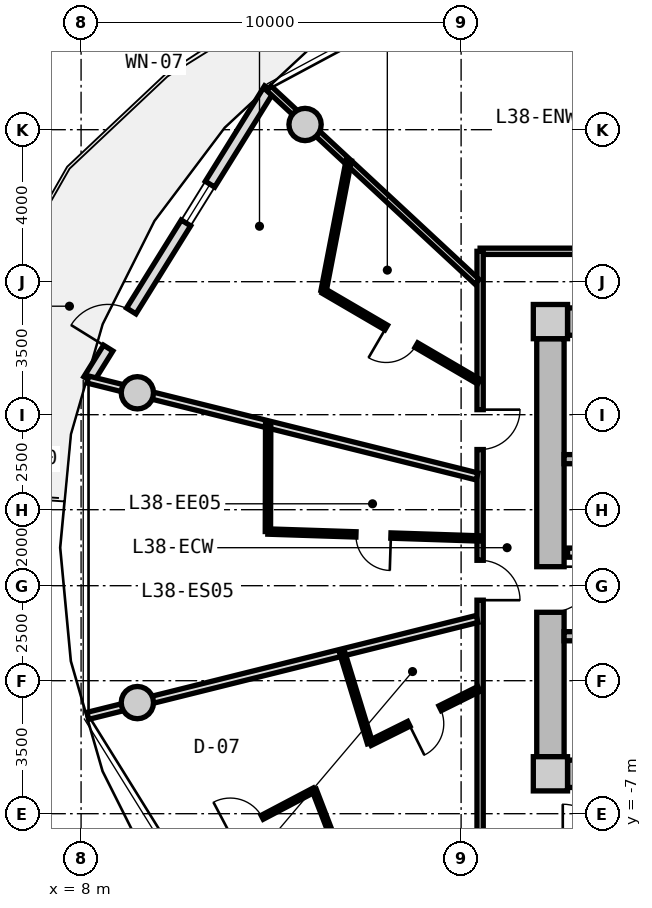
"""IFC4 building model, lengths in metres.
Left out: names, types, materials, properties, quantities, classifications, styles, units other than length and angle.
Written with IfcOpenShell. Run it as: python <this file> out.ifc"""

import sys

from ifc_helpers import new_model, si_unit, direction, frame, frame_2d, origin, origin_2d, place, context, subcontext, project, spatial, rectangle, circle, extrude, source, transform, mapped, element, fill, save


model = new_model("IFC4")
c1 = context("Model", 3, precision=1e-05, world=origin(), true_north=direction((0.0, 1.0)))
c2 = subcontext(c1, "Body", "Model", "MODEL_VIEW")
j1 = project(units=[si_unit("LENGTHUNIT", "METRE"), si_unit("PLANEANGLEUNIT", "RADIAN")], contexts=[c1])
p1 = place(None, origin())
s1 = spatial("IfcSite", under=j1, at=p1, CompositionType="ELEMENT")
p2 = place(p1, origin())
s2 = spatial("IfcBuilding", under=s1, at=p2, CompositionType="ELEMENT")
p3 = place(p2, frame((0.0, 0.0, 123.7)))
s3 = spatial("IfcBuildingStorey", under=s2, at=p3, CompositionType="ELEMENT", Elevation=123.7)
m1 = source(origin(), c2, "Body", "SweptSolid", [
    extrude(rectangle(XDim=0.9, YDim=0.9, at=origin_2d()), origin(), (0.0, 0.0, 1.0), 3.05),
])
for number, where, z_axis, x_axis in (
    (1, (20.35, -5.95, 0.0), (0.0, 0.0, 1.0), (1.0, 0.0, 0.0)),
    (2, (20.35, 5.95, 0.0), (0.0, 0.0, 1.0), (1.0, 0.0, 0.0)),
):
    element("IfcColumn", number, at=place(p3, frame(where, z_axis=z_axis, x_axis=x_axis)), inside=s3, PredefinedType="COLUMN", context=c2, shape_type="MappedRepresentation", body=[
        mapped(m1, transform((0.0, 0.0, 0.0), x_axis=(1.0, 0.0, 0.0), y_axis=(0.0, 1.0, 0.0), z_axis=(0.0, 0.0, 1.0), scale=1.0)),
    ])
m2 = source(origin(), c2, "Body", "SweptSolid", [
    extrude(rectangle(XDim=14.4, YDim=0.72, at=frame_2d((7.2, 0.0))), origin(), (0.0, 0.0, 1.0), 2.79),
])
for number, where, z_axis, x_axis in (
    (3, (20.8, 5.95, 0.0), (0.0, 0.0, 1.0), (1.0, 0.0, 0.0)),
    (4, (35.2, -5.95, 0.0), (0.0, 0.0, 1.0), (-1.0, 0.0, 0.0)),
):
    element("IfcWall", number, at=place(p3, frame(where, z_axis=z_axis, x_axis=x_axis)), inside=s3, PredefinedType="SHEAR", context=c2, shape_type="MappedRepresentation", body=[
        mapped(m2, transform((0.0, 0.0, 0.0), x_axis=(1.0, 0.0, 0.0), y_axis=(0.0, 1.0, 0.0), z_axis=(0.0, 0.0, 1.0), scale=1.0)),
    ])
m3 = source(origin(), c2, "Body", "SweptSolid", [
    extrude(rectangle(XDim=11.0, YDim=0.72, at=frame_2d((5.5, 0.0))), origin(), (0.0, 0.0, 1.0), 2.79),
])
p4 = place(p3, frame((20.35, -5.5, 0.0), z_axis=(0.0, 0.0, 1.0), x_axis=(0.0, 1.0, 0.0)))
e5 = element("IfcWall", 5, at=p4, inside=s3, PredefinedType="SHEAR", context=c2, shape_type="MappedRepresentation", body=[
    mapped(m3, transform((0.0, 0.0, 0.0), x_axis=(1.0, 0.0, 0.0), y_axis=(0.0, 1.0, 0.0), z_axis=(0.0, 0.0, 1.0), scale=1.0)),
])
p5 = place(p4, frame((3.8, 0.0, 0.0)))
e6 = element("IfcOpeningElement", 6, at=p5, cuts=e5, PredefinedType="OPENING", context=c2, shape_type="SweptSolid", body=[
    extrude(rectangle(XDim=1.2, YDim=2.15, at=frame_2d((0.6, 1.075))), frame((0.0, 0.37, 0.0), z_axis=(0.0, -1.0, 0.0), x_axis=(1.0, 0.0, 0.0)), (0.0, 0.0, 1.0), 0.74),
])
m4 = source(origin(), c2, "Body", "SweptSolid", [
    extrude(circle(Radius=0.425, at=origin_2d()), origin(), (0.0, 0.0, 1.0), 3.05),
])
for number, where, z_axis, x_axis in (
    (7, (13.894, 11.137, 0.0), (0.0, 0.0, 1.0), (1.0, 0.0, 0.0)),
    (8, (9.481, 4.076, 0.0), (0.0, 0.0, 1.0), (1.0, 0.0, 0.0)),
    (9, (9.481, -4.076, 0.0), (0.0, 0.0, 1.0), (1.0, 0.0, 0.0)),
):
    element("IfcColumn", number, at=place(p3, frame(where, z_axis=z_axis, x_axis=x_axis)), inside=s3, PredefinedType="COLUMN", context=c2, shape_type="MappedRepresentation", body=[
        mapped(m4, transform((0.0, 0.0, 0.0), x_axis=(1.0, 0.0, 0.0), y_axis=(0.0, 1.0, 0.0), z_axis=(0.0, 0.0, 1.0), scale=1.0)),
    ])
m5 = source(origin(), c2, "Body", "SweptSolid", [
    extrude(rectangle(XDim=9.014, YDim=0.29, at=frame_2d((4.507, 0.0))), origin(), (0.0, 0.0, 1.0), 2.79),
])
p6 = place(p3, frame((8.196, 4.421, 0.0), z_axis=(0.0, 0.0, 1.0), x_axis=(0.527732945084, 0.849410347637, 0.0)))
e10 = element("IfcWall", 10, at=p6, inside=s3, PredefinedType="SOLIDWALL", context=c2, shape_type="MappedRepresentation", body=[
    mapped(m5, transform((0.0, 0.0, 0.0), x_axis=(1.0, 0.0, 0.0), y_axis=(0.0, 1.0, 0.0), z_axis=(0.0, 0.0, 1.0), scale=1.0)),
])
p7 = place(p6, frame((0.98, 0.0, 0.0)))
e11 = element("IfcOpeningElement", 11, at=p7, cuts=e10, PredefinedType="OPENING", context=c2, shape_type="SweptSolid", body=[
    extrude(rectangle(XDim=1.15, YDim=2.25, at=frame_2d((0.575, 1.125))), frame((0.0, 0.155, 0.0), z_axis=(0.0, -1.0, 0.0), x_axis=(1.0, 0.0, 0.0)), (0.0, 0.0, 1.0), 0.31),
])
p8 = place(p6, frame((4.857, 0.0, 0.85)))
e12 = element("IfcOpeningElement", 12, at=p8, cuts=e10, PredefinedType="OPENING", context=c2, shape_type="SweptSolid", body=[
    extrude(rectangle(XDim=1.2, YDim=1.5, at=frame_2d((0.6, 0.75))), frame((0.0, 0.155, 0.0), z_axis=(0.0, -1.0, 0.0), x_axis=(1.0, 0.0, 0.0)), (0.0, 0.0, 1.0), 0.31),
])
m6 = source(origin(), c2, "Body", "SweptSolid", [
    extrude(rectangle(XDim=7.83, YDim=0.24, at=frame_2d((3.915, 0.0))), origin(), (0.0, 0.0, 1.0), 2.79),
])
p9 = place(p3, frame((20.71, 2.33, 0.0), z_axis=(0.0, 0.0, 1.0), x_axis=(1.0, 0.0, 0.0)))
e13 = element("IfcWall", 13, at=p9, inside=s3, PredefinedType="PARTITIONING", context=c2, shape_type="MappedRepresentation", body=[
    mapped(m6, transform((0.0, 0.0, 0.0), x_axis=(1.0, 0.0, 0.0), y_axis=(0.0, 1.0, 0.0), z_axis=(0.0, 0.0, 1.0), scale=1.0)),
])
p10 = place(p3, frame((20.71, -2.33, 0.0), z_axis=(0.0, 0.0, 1.0), x_axis=(1.0, 0.0, 0.0)))
e14 = element("IfcWall", 14, at=p10, inside=s3, PredefinedType="PARTITIONING", context=c2, shape_type="MappedRepresentation", body=[
    mapped(m6, transform((0.0, 0.0, 0.0), x_axis=(1.0, 0.0, 0.0), y_axis=(0.0, 1.0, 0.0), z_axis=(0.0, 0.0, 1.0), scale=1.0)),
])
p11 = place(p10, frame((0.95, 0.0, 0.0)))
e15 = element("IfcOpeningElement", 15, at=p11, cuts=e14, PredefinedType="OPENING", context=c2, shape_type="SweptSolid", body=[
    extrude(rectangle(XDim=1.1, YDim=2.15, at=frame_2d((0.55, 1.075))), frame((0.0, 0.13, 0.0), z_axis=(0.0, -1.0, 0.0), x_axis=(1.0, 0.0, 0.0)), (0.0, 0.0, 1.0), 0.26),
])
m7 = source(origin(), c2, "Body", "SweptSolid", [
    extrude(rectangle(XDim=7.62, YDim=0.24, at=frame_2d((3.81, 0.0))), origin(), (0.0, 0.0, 1.0), 2.775),
])
p12 = place(p3, frame((20.8, -0.13, 0.0), z_axis=(0.0, 0.0, 1.0), x_axis=(1.0, 0.0, 0.0)))
e16 = element("IfcWall", 16, at=p12, inside=s3, PredefinedType="PARTITIONING", context=c2, shape_type="MappedRepresentation", body=[
    mapped(m7, transform((0.0, 0.0, 0.0), x_axis=(1.0, 0.0, 0.0), y_axis=(0.0, 1.0, 0.0), z_axis=(0.0, 0.0, 1.0), scale=1.0)),
])
p13 = place(p12, frame((6.22, 0.0, 0.0)))
e17 = element("IfcOpeningElement", 17, at=p13, cuts=e16, PredefinedType="OPENING", context=c2, shape_type="SweptSolid", body=[
    extrude(rectangle(XDim=1.0, YDim=2.1, at=frame_2d((0.5, 1.05))), frame((0.0, 0.13, 0.0), z_axis=(0.0, -1.0, 0.0), x_axis=(1.0, 0.0, 0.0)), (0.0, 0.0, 1.0), 0.26),
])
p14 = place(p12, frame((2.4, 0.0, 0.0)))
e18 = element("IfcOpeningElement", 18, at=p14, cuts=e16, PredefinedType="OPENING", context=c2, shape_type="SweptSolid", body=[
    extrude(rectangle(XDim=1.0, YDim=2.1, at=frame_2d((0.5, 1.05))), frame((0.0, 0.13, 0.0), z_axis=(0.0, -1.0, 0.0), x_axis=(1.0, 0.0, 0.0)), (0.0, 0.0, 1.0), 0.26),
])
m8 = source(origin(), c2, "Body", "SweptSolid", [
    extrude(rectangle(XDim=8.6, YDim=0.165, at=frame_2d((4.3, 0.0))), origin(), (0.0, 0.0, 1.0), 2.775),
])
p15 = place(p3, frame((18.5, 7.8, 0.0), z_axis=(0.0, 0.0, 1.0), x_axis=(1.0, 0.0, 0.0)))
e19 = element("IfcWall", 19, at=p15, inside=s3, PredefinedType="PARTITIONING", context=c2, shape_type="MappedRepresentation", body=[
    mapped(m8, transform((0.0, 0.0, 0.0), x_axis=(1.0, 0.0, 0.0), y_axis=(0.0, 1.0, 0.0), z_axis=(0.0, 0.0, 1.0), scale=1.0)),
])
p16 = place(p15, frame((3.509, 0.0, 0.0)))
e20 = element("IfcOpeningElement", 20, at=p16, cuts=e19, PredefinedType="OPENING", context=c2, shape_type="SweptSolid", body=[
    extrude(rectangle(XDim=1.05, YDim=2.15, at=frame_2d((0.525, 1.075))), frame((0.0, 0.093, 0.0), z_axis=(0.0, -1.0, 0.0), x_axis=(1.0, 0.0, 0.0)), (0.0, 0.0, 1.0), 0.185),
])
m9 = source(origin(), c2, "Body", "SweptSolid", [
    extrude(rectangle(XDim=15.6, YDim=0.165, at=frame_2d((7.8, 0.0))), origin(), (0.0, 0.0, 1.0), 2.775),
])
p17 = place(p3, frame((18.5, -7.8, 0.0), z_axis=(0.0, 0.0, 1.0), x_axis=(0.0, 1.0, 0.0)))
e21 = element("IfcWall", 21, at=p17, inside=s3, PredefinedType="PARTITIONING", context=c2, shape_type="MappedRepresentation", body=[
    mapped(m9, transform((0.0, 0.0, 0.0), x_axis=(1.0, 0.0, 0.0), y_axis=(0.0, 1.0, 0.0), z_axis=(0.0, 0.0, 1.0), scale=1.0)),
])
p18 = place(p17, frame((10.383, 0.0, 0.0)))
e22 = element("IfcOpeningElement", 22, at=p18, cuts=e21, PredefinedType="OPENING", context=c2, shape_type="SweptSolid", body=[
    extrude(rectangle(XDim=1.05, YDim=2.15, at=frame_2d((0.525, 1.075))), frame((0.0, 0.093, 0.0), z_axis=(0.0, -1.0, 0.0), x_axis=(1.0, 0.0, 0.0)), (0.0, 0.0, 1.0), 0.185),
])
p19 = place(p17, frame((6.419, 0.0, 0.0)))
e23 = element("IfcOpeningElement", 23, at=p19, cuts=e21, PredefinedType="OPENING", context=c2, shape_type="SweptSolid", body=[
    extrude(rectangle(XDim=1.05, YDim=2.15, at=frame_2d((0.525, 1.075))), frame((0.0, 0.093, 0.0), z_axis=(0.0, -1.0, 0.0), x_axis=(1.0, 0.0, 0.0)), (0.0, 0.0, 1.0), 0.185),
])
m10 = source(origin(), c2, "Body", "SweptSolid", [
    extrude(rectangle(XDim=7.482, YDim=0.165, at=frame_2d((3.741, 0.0))), origin(), (0.0, 0.0, 1.0), 2.275),
])
p20 = place(p3, frame((18.42, 6.998, 0.0), z_axis=(0.0, 0.0, 1.0), x_axis=(-0.732508698043, 0.680757671489, 0.0)))
e24 = element("IfcWall", 24, at=p20, inside=s3, PredefinedType="PARTITIONING", context=c2, shape_type="MappedRepresentation", body=[
    mapped(m10, transform((0.0, 0.0, 0.0), x_axis=(1.0, 0.0, 0.0), y_axis=(0.0, 1.0, 0.0), z_axis=(0.0, 0.0, 1.0), scale=1.0)),
])
m11 = source(origin(), c2, "Body", "SweptSolid", [
    extrude(rectangle(XDim=10.556, YDim=0.19, at=frame_2d((5.278, 0.0))), origin(), (0.0, 0.0, 1.0), 2.275),
])
p21 = place(p3, frame((18.42, 1.875, 0.0), z_axis=(0.0, 0.0, 1.0), x_axis=(-0.970363857851, 0.241648470667, 0.0)))
e25 = element("IfcWall", 25, at=p21, inside=s3, PredefinedType="PARTITIONING", context=c2, shape_type="MappedRepresentation", body=[
    mapped(m11, transform((0.0, 0.0, 0.0), x_axis=(1.0, 0.0, 0.0), y_axis=(0.0, 1.0, 0.0), z_axis=(0.0, 0.0, 1.0), scale=1.0)),
])
m12 = source(origin(), c2, "Body", "SweptSolid", [
    extrude(rectangle(XDim=4.735, YDim=0.14, at=frame_2d((2.368, 0.0))), origin(), (0.0, 0.0, 1.0), 2.775),
])
p22 = place(p3, frame((18.47, 4.368, 0.0), z_axis=(0.0, 0.0, 1.0), x_axis=(-0.863537576642, 0.504284496814, 0.0)))
e26 = element("IfcWall", 26, at=p22, inside=s3, PredefinedType="PARTITIONING", context=c2, shape_type="MappedRepresentation", body=[
    mapped(m12, transform((0.0, 0.0, 0.0), x_axis=(1.0, 0.0, 0.0), y_axis=(0.0, 1.0, 0.0), z_axis=(0.0, 0.0, 1.0), scale=1.0)),
])
p23 = place(p22, frame((1.908, 0.0, 0.0)))
e27 = element("IfcOpeningElement", 27, at=p23, cuts=e26, PredefinedType="OPENING", context=c2, shape_type="SweptSolid", body=[
    extrude(rectangle(XDim=0.92, YDim=2.1, at=frame_2d((0.46, 1.05))), frame((0.0, 0.08, 0.0), z_axis=(0.0, -1.0, 0.0), x_axis=(1.0, 0.0, 0.0)), (0.0, 0.0, 1.0), 0.16),
])
m13 = source(origin(), c2, "Body", "SweptSolid", [
    extrude(rectangle(XDim=3.499, YDim=0.14, at=frame_2d((1.75, 0.0))), origin(), (0.0, 0.0, 1.0), 2.775),
])
p24 = place(p3, frame((14.381, 6.756, 0.0), z_axis=(0.0, 0.0, 1.0), x_axis=(0.18957713629, 0.981865830649, 0.0)))
e28 = element("IfcWall", 28, at=p24, inside=s3, PredefinedType="PARTITIONING", context=c2, shape_type="MappedRepresentation", body=[
    mapped(m13, transform((0.0, 0.0, 0.0), x_axis=(1.0, 0.0, 0.0), y_axis=(0.0, 1.0, 0.0), z_axis=(0.0, 0.0, 1.0), scale=1.0)),
])
p25 = place(p3, frame((18.42, -1.875, 0.0), z_axis=(0.0, 0.0, 1.0), x_axis=(-0.970363857851, -0.241648470667, 0.0)))
e29 = element("IfcWall", 29, at=p25, inside=s3, PredefinedType="PARTITIONING", context=c2, shape_type="MappedRepresentation", body=[
    mapped(m11, transform((0.0, 0.0, 0.0), x_axis=(1.0, 0.0, 0.0), y_axis=(0.0, 1.0, 0.0), z_axis=(0.0, 0.0, 1.0), scale=1.0)),
])
m14 = source(origin(), c2, "Body", "SweptSolid", [
    extrude(rectangle(XDim=5.557, YDim=0.14, at=frame_2d((2.778, 0.0))), origin(), (0.0, 0.0, 1.0), 2.775),
])
p26 = place(p3, frame((18.47, 0.244, 0.0), z_axis=(0.0, 0.0, 1.0), x_axis=(-0.999468495627, 0.03259948234, 0.0)))
e30 = element("IfcWall", 30, at=p26, inside=s3, PredefinedType="PARTITIONING", context=c2, shape_type="MappedRepresentation", body=[
    mapped(m14, transform((0.0, 0.0, 0.0), x_axis=(1.0, 0.0, 0.0), y_axis=(0.0, 1.0, 0.0), z_axis=(0.0, 0.0, 1.0), scale=1.0)),
])
p27 = place(p26, frame((2.318, 0.0, 0.0)))
e31 = element("IfcOpeningElement", 31, at=p27, cuts=e30, PredefinedType="OPENING", context=c2, shape_type="SweptSolid", body=[
    extrude(rectangle(XDim=0.92, YDim=2.1, at=frame_2d((0.46, 1.05))), frame((0.0, 0.08, 0.0), z_axis=(0.0, -1.0, 0.0), x_axis=(1.0, 0.0, 0.0)), (0.0, 0.0, 1.0), 0.16),
])
m15 = source(origin(), c2, "Body", "SweptSolid", [
    extrude(rectangle(XDim=2.837, YDim=0.14, at=frame_2d((1.418, 0.0))), origin(), (0.0, 0.0, 1.0), 2.775),
])
p28 = place(p3, frame((12.916, 0.425, 0.0), z_axis=(0.0, 0.0, 1.0), x_axis=(0.002409838945, 0.999997096334, 0.0)))
e32 = element("IfcWall", 32, at=p28, inside=s3, PredefinedType="PARTITIONING", context=c2, shape_type="MappedRepresentation", body=[
    mapped(m15, transform((0.0, 0.0, 0.0), x_axis=(1.0, 0.0, 0.0), y_axis=(0.0, 1.0, 0.0), z_axis=(0.0, 0.0, 1.0), scale=1.0)),
])
m16 = source(origin(), c2, "Body", "SweptSolid", [
    extrude(rectangle(XDim=3.203, YDim=0.14, at=frame_2d((1.601, 0.0))), origin(), (0.0, 0.0, 1.0), 2.775),
])
p29 = place(p3, frame((18.47, -3.717, 0.0), z_axis=(0.0, 0.0, 1.0), x_axis=(-0.895552551978, -0.444955758077, 0.0)))
e33 = element("IfcWall", 33, at=p29, inside=s3, PredefinedType="PARTITIONING", context=c2, shape_type="MappedRepresentation", body=[
    mapped(m16, transform((0.0, 0.0, 0.0), x_axis=(1.0, 0.0, 0.0), y_axis=(0.0, 1.0, 0.0), z_axis=(0.0, 0.0, 1.0), scale=1.0)),
])
p30 = place(p29, frame((1.141, 0.0, 0.0)))
e34 = element("IfcOpeningElement", 34, at=p30, cuts=e33, PredefinedType="OPENING", context=c2, shape_type="SweptSolid", body=[
    extrude(rectangle(XDim=0.92, YDim=2.1, at=frame_2d((0.46, 1.05))), frame((0.0, 0.08, 0.0), z_axis=(0.0, -1.0, 0.0), x_axis=(1.0, 0.0, 0.0)), (0.0, 0.0, 1.0), 0.16),
])
m17 = source(origin(), c2, "Body", "SweptSolid", [
    extrude(rectangle(XDim=2.478, YDim=0.14, at=frame_2d((1.239, 0.0))), origin(), (0.0, 0.0, 1.0), 2.775),
])
p31 = place(p3, frame((15.602, -5.142, 0.0), z_axis=(0.0, 0.0, 1.0), x_axis=(-0.293372504398, 0.955998207981, 0.0)))
e35 = element("IfcWall", 35, at=p31, inside=s3, PredefinedType="PARTITIONING", context=c2, shape_type="MappedRepresentation", body=[
    mapped(m17, transform((0.0, 0.0, 0.0), x_axis=(1.0, 0.0, 0.0), y_axis=(0.0, 1.0, 0.0), z_axis=(0.0, 0.0, 1.0), scale=1.0)),
])
m18 = source(origin(), c2, "Body", "SweptSolid", [
    extrude(rectangle(XDim=4.042, YDim=0.115, at=frame_2d((2.021, 0.0))), origin(), (0.0, 0.0, 1.0), 2.775),
])
p32 = place(p3, frame((14.134, -6.375, 0.0), z_axis=(0.0, 0.0, 1.0), x_axis=(-0.88476748851, -0.466032714812, 0.0)))
e36 = element("IfcWall", 36, at=p32, inside=s3, PredefinedType="PARTITIONING", context=c2, shape_type="MappedRepresentation", body=[
    mapped(m18, transform((0.0, 0.0, 0.0), x_axis=(1.0, 0.0, 0.0), y_axis=(0.0, 1.0, 0.0), z_axis=(0.0, 0.0, 1.0), scale=1.0)),
])
p33 = place(p32, frame((1.546, 0.0, 0.0)))
e37 = element("IfcOpeningElement", 37, at=p33, cuts=e36, PredefinedType="OPENING", context=c2, shape_type="SweptSolid", body=[
    extrude(rectangle(XDim=0.95, YDim=2.1, at=frame_2d((0.475, 1.05))), frame((0.0, 0.067, 0.0), z_axis=(0.0, -1.0, 0.0), x_axis=(1.0, 0.0, 0.0)), (0.0, 0.0, 1.0), 0.135),
])
m19 = source(origin(), c2, "Body", "SweptSolid", [
    extrude(rectangle(XDim=3.677, YDim=0.115, at=frame_2d((1.838, 0.0))), origin(), (0.0, 0.0, 1.0), 2.775),
])
p34 = place(p3, frame((14.134, -6.375, 0.0), z_axis=(0.0, 0.0, 1.0), x_axis=(0.359592980271, -0.933109258629, 0.0)))
e38 = element("IfcWall", 38, at=p34, inside=s3, PredefinedType="PARTITIONING", context=c2, shape_type="MappedRepresentation", body=[
    mapped(m19, transform((0.0, 0.0, 0.0), x_axis=(1.0, 0.0, 0.0), y_axis=(0.0, 1.0, 0.0), z_axis=(0.0, 0.0, 1.0), scale=1.0)),
])
m20 = source(origin(), c2, "Body", "SweptSolid", [
    extrude(rectangle(XDim=1.15, YDim=2.25, at=frame_2d((0.575, 1.125))), frame((0.0, 0.025, 0.0), z_axis=(0.0, -1.0, 0.0), x_axis=(1.0, 0.0, 0.0)), (0.0, 0.0, 1.0), 0.05),
])
p35 = place(p7, origin())
e39 = element("IfcDoor", 39, at=p35, inside=s3, OperationType="SINGLE_SWING_LEFT", PredefinedType="DOOR", context=c2, shape_type="MappedRepresentation", body=[
    mapped(m20, transform((0.0, 0.0, 0.0), x_axis=(1.0, 0.0, 0.0), y_axis=(0.0, 1.0, 0.0), z_axis=(0.0, 0.0, 1.0), scale=1.0)),
])
fill(e11, e39)
m21 = source(origin(), c2, "Body", "SweptSolid", [
    extrude(rectangle(XDim=1.2, YDim=1.5, at=frame_2d((0.6, 0.75))), frame((0.0, 0.03, 0.0), z_axis=(0.0, -1.0, 0.0), x_axis=(1.0, 0.0, 0.0)), (0.0, 0.0, 1.0), 0.06),
])
p36 = place(p8, origin())
e40 = element("IfcWindow", 40, at=p36, inside=s3, PartitioningType="SINGLE_PANEL", PredefinedType="WINDOW", context=c2, shape_type="MappedRepresentation", body=[
    mapped(m21, transform((0.0, 0.0, 0.0), x_axis=(1.0, 0.0, 0.0), y_axis=(0.0, 1.0, 0.0), z_axis=(0.0, 0.0, 1.0), scale=1.0)),
])
fill(e12, e40)
m22 = source(origin(), c2, "Body", "SweptSolid", [
    extrude(rectangle(XDim=1.2, YDim=2.15, at=frame_2d((0.6, 1.075))), frame((0.0, 0.025, 0.0), z_axis=(0.0, -1.0, 0.0), x_axis=(1.0, 0.0, 0.0)), (0.0, 0.0, 1.0), 0.05),
])
p37 = place(p5, frame((1.2, 0.0, 0.0), z_axis=(0.0, 0.0, 1.0), x_axis=(-1.0, 0.0, 0.0)))
e41 = element("IfcDoor", 41, at=p37, inside=s3, OperationType="SINGLE_SWING_LEFT", PredefinedType="DOOR", context=c2, shape_type="MappedRepresentation", body=[
    mapped(m22, transform((0.0, 0.0, 0.0), x_axis=(1.0, 0.0, 0.0), y_axis=(0.0, 1.0, 0.0), z_axis=(0.0, 0.0, 1.0), scale=1.0)),
])
fill(e6, e41)
m23 = source(origin(), c2, "Body", "SweptSolid", [
    extrude(rectangle(XDim=1.05, YDim=2.15, at=frame_2d((0.525, 1.075))), frame((0.0, 0.025, 0.0), z_axis=(0.0, -1.0, 0.0), x_axis=(1.0, 0.0, 0.0)), (0.0, 0.0, 1.0), 0.05),
])
p38 = place(p18, frame((1.05, 0.0, 0.0), z_axis=(0.0, 0.0, 1.0), x_axis=(-1.0, 0.0, 0.0)))
e42 = element("IfcDoor", 42, at=p38, inside=s3, OperationType="SINGLE_SWING_LEFT", PredefinedType="DOOR", context=c2, shape_type="MappedRepresentation", body=[
    mapped(m23, transform((0.0, 0.0, 0.0), x_axis=(1.0, 0.0, 0.0), y_axis=(0.0, 1.0, 0.0), z_axis=(0.0, 0.0, 1.0), scale=1.0)),
])
fill(e22, e42)
m24 = source(origin(), c2, "Body", "SweptSolid", [
    extrude(rectangle(XDim=0.92, YDim=2.1, at=frame_2d((0.46, 1.05))), frame((0.0, 0.025, 0.0), z_axis=(0.0, -1.0, 0.0), x_axis=(1.0, 0.0, 0.0)), (0.0, 0.0, 1.0), 0.05),
])
p39 = place(p23, origin())
e43 = element("IfcDoor", 43, at=p39, inside=s3, OperationType="SINGLE_SWING_RIGHT", PredefinedType="DOOR", context=c2, shape_type="MappedRepresentation", body=[
    mapped(m24, transform((0.0, 0.0, 0.0), x_axis=(1.0, 0.0, 0.0), y_axis=(0.0, 1.0, 0.0), z_axis=(0.0, 0.0, 1.0), scale=1.0)),
])
fill(e27, e43)
p40 = place(p19, frame((1.05, 0.0, 0.0), z_axis=(0.0, 0.0, 1.0), x_axis=(-1.0, 0.0, 0.0)))
e44 = element("IfcDoor", 44, at=p40, inside=s3, OperationType="SINGLE_SWING_RIGHT", PredefinedType="DOOR", context=c2, shape_type="MappedRepresentation", body=[
    mapped(m23, transform((0.0, 0.0, 0.0), x_axis=(1.0, 0.0, 0.0), y_axis=(0.0, 1.0, 0.0), z_axis=(0.0, 0.0, 1.0), scale=1.0)),
])
fill(e23, e44)
p41 = place(p27, origin())
e45 = element("IfcDoor", 45, at=p41, inside=s3, OperationType="SINGLE_SWING_LEFT", PredefinedType="DOOR", context=c2, shape_type="MappedRepresentation", body=[
    mapped(m24, transform((0.0, 0.0, 0.0), x_axis=(1.0, 0.0, 0.0), y_axis=(0.0, 1.0, 0.0), z_axis=(0.0, 0.0, 1.0), scale=1.0)),
])
fill(e31, e45)
p42 = place(p30, origin())
e46 = element("IfcDoor", 46, at=p42, inside=s3, OperationType="SINGLE_SWING_RIGHT", PredefinedType="DOOR", context=c2, shape_type="MappedRepresentation", body=[
    mapped(m24, transform((0.0, 0.0, 0.0), x_axis=(1.0, 0.0, 0.0), y_axis=(0.0, 1.0, 0.0), z_axis=(0.0, 0.0, 1.0), scale=1.0)),
])
fill(e34, e46)
m25 = source(origin(), c2, "Body", "SweptSolid", [
    extrude(rectangle(XDim=0.95, YDim=2.1, at=frame_2d((0.475, 1.05))), frame((0.0, 0.025, 0.0), z_axis=(0.0, -1.0, 0.0), x_axis=(1.0, 0.0, 0.0)), (0.0, 0.0, 1.0), 0.05),
])
p43 = place(p33, frame((0.95, 0.0, 0.0), z_axis=(0.0, 0.0, 1.0), x_axis=(-1.0, 0.0, 0.0)))
e47 = element("IfcDoor", 47, at=p43, inside=s3, OperationType="SINGLE_SWING_LEFT", PredefinedType="DOOR", context=c2, shape_type="MappedRepresentation", body=[
    mapped(m25, transform((0.0, 0.0, 0.0), x_axis=(1.0, 0.0, 0.0), y_axis=(0.0, 1.0, 0.0), z_axis=(0.0, 0.0, 1.0), scale=1.0)),
])
fill(e37, e47)
save(model, sys.argv[1])
